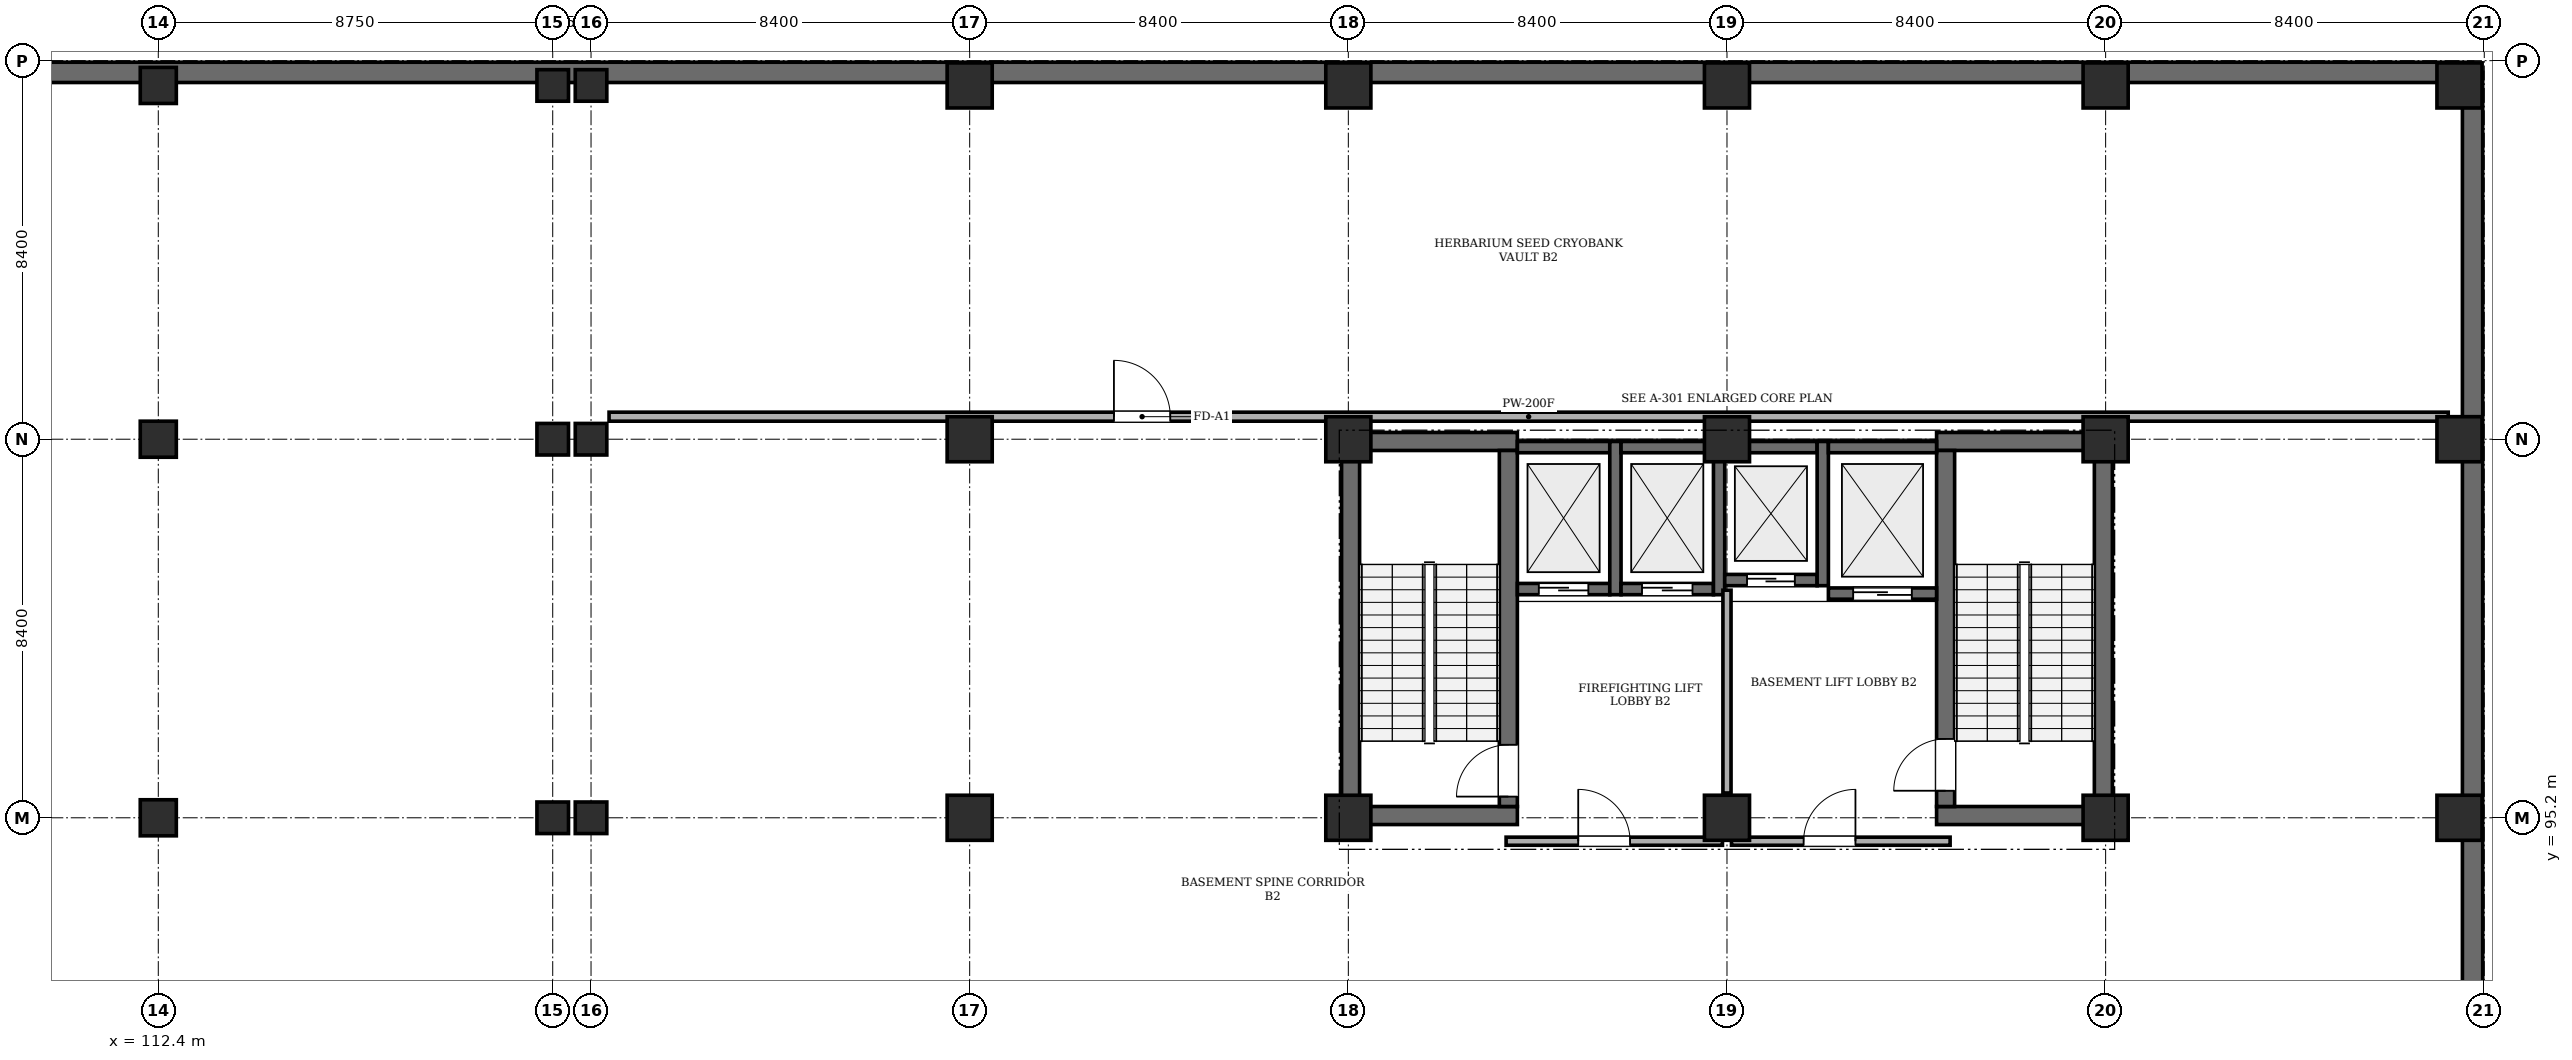
"""IFC4 building model, lengths in metres.
Left out: names, types, materials, properties, quantities, classifications, styles, units other than length and angle.
Written with IfcOpenShell. Run it as: python <this file> out.ifc"""

import sys

from ifc_helpers import new_model, si_unit, direction, frame, frame_2d, origin, origin_2d, place, context, subcontext, project, spatial, rectangle, extrude, element, fill, save


model = new_model("IFC4")
c1 = context("Model", 3, precision=1e-05, world=origin(), true_north=direction((0.0, 1.0)))
c2 = subcontext(c1, "Body", "Model", "MODEL_VIEW")
j1 = project(units=[si_unit("LENGTHUNIT", "METRE"), si_unit("PLANEANGLEUNIT", "RADIAN")], contexts=[c1])
p1 = place(None, origin())
s1 = spatial("IfcSite", under=j1, at=p1, CompositionType="ELEMENT")
p2 = place(p1, origin())
s2 = spatial("IfcBuilding", under=s1, at=p2, CompositionType="ELEMENT")
p3 = place(p2, frame((0.0, 0.0, -9.6)))
s3 = spatial("IfcBuildingStorey", under=s2, at=p3, CompositionType="ELEMENT", Elevation=-9.6)
for number, where, z_axis, x_axis in (
    (1, (112.4, 95.2, 0.0), (0.0, 0.0, 1.0), (1.0, 0.0, 0.0)),
    (2, (112.4, 103.6, 0.0), (0.0, 0.0, 1.0), (1.0, 0.0, 0.0)),
    (3, (112.4, 111.45, 0.0), (0.0, 0.0, 1.0), (1.0, 0.0, 0.0)),
):
    element("IfcColumn", number, at=place(p3, frame(where, z_axis=z_axis, x_axis=x_axis)), inside=s3, PredefinedType="COLUMN", context=c2, shape_type="SweptSolid", body=[
        extrude(rectangle(XDim=0.8, YDim=0.8, at=origin_2d()), origin(), (0.0, 0.0, 1.0), 4.48),
    ])
for number, where, z_axis, x_axis in (
    (4, (121.15, 95.2, 0.0), (0.0, 0.0, 1.0), (1.0, 0.0, 0.0)),
    (5, (121.15, 103.6, 0.0), (0.0, 0.0, 1.0), (1.0, 0.0, 0.0)),
    (6, (121.15, 111.45, 0.0), (0.0, 0.0, 1.0), (1.0, 0.0, 0.0)),
    (7, (122.0, 95.2, 0.0), (0.0, 0.0, 1.0), (1.0, 0.0, 0.0)),
    (8, (122.0, 103.6, 0.0), (0.0, 0.0, 1.0), (1.0, 0.0, 0.0)),
    (9, (122.0, 111.45, 0.0), (0.0, 0.0, 1.0), (1.0, 0.0, 0.0)),
):
    element("IfcColumn", number, at=place(p3, frame(where, z_axis=z_axis, x_axis=x_axis)), inside=s3, PredefinedType="COLUMN", context=c2, shape_type="SweptSolid", body=[
        extrude(rectangle(XDim=0.7, YDim=0.7, at=origin_2d()), origin(), (0.0, 0.0, 1.0), 4.48),
    ])
for number, where, z_axis, x_axis in (
    (10, (130.4, 95.2, 0.0), (0.0, 0.0, 1.0), (1.0, 0.0, 0.0)),
    (11, (130.4, 103.6, 0.0), (0.0, 0.0, 1.0), (1.0, 0.0, 0.0)),
    (12, (130.4, 111.45, 0.0), (0.0, 0.0, 1.0), (1.0, 0.0, 0.0)),
    (13, (138.8, 95.2, 0.0), (0.0, 0.0, 1.0), (1.0, 0.0, 0.0)),
    (14, (138.8, 103.6, 0.0), (0.0, 0.0, 1.0), (1.0, 0.0, 0.0)),
    (15, (138.8, 111.45, 0.0), (0.0, 0.0, 1.0), (1.0, 0.0, 0.0)),
    (16, (147.2, 95.2, 0.0), (0.0, 0.0, 1.0), (1.0, 0.0, 0.0)),
    (17, (147.2, 103.6, 0.0), (0.0, 0.0, 1.0), (1.0, 0.0, 0.0)),
    (18, (147.2, 111.45, 0.0), (0.0, 0.0, 1.0), (1.0, 0.0, 0.0)),
    (19, (155.6, 95.2, 0.0), (0.0, 0.0, 1.0), (1.0, 0.0, 0.0)),
    (20, (155.6, 103.6, 0.0), (0.0, 0.0, 1.0), (1.0, 0.0, 0.0)),
    (21, (155.6, 111.45, 0.0), (0.0, 0.0, 1.0), (1.0, 0.0, 0.0)),
    (22, (163.45, 95.2, 0.0), (0.0, 0.0, 1.0), (1.0, 0.0, 0.0)),
    (23, (163.45, 103.6, 0.0), (0.0, 0.0, 1.0), (1.0, 0.0, 0.0)),
    (24, (163.45, 111.45, 0.0), (0.0, 0.0, 1.0), (1.0, 0.0, 0.0)),
):
    element("IfcColumn", number, at=place(p3, frame(where, z_axis=z_axis, x_axis=x_axis)), inside=s3, PredefinedType="COLUMN", context=c2, shape_type="SweptSolid", body=[
        extrude(rectangle(XDim=1.0, YDim=1.0, at=origin_2d()), origin(), (0.0, 0.0, 1.0), 4.48),
    ])
p4 = place(p3, frame((163.74, 0.26, 0.0), z_axis=(0.0, 0.0, 1.0), x_axis=(0.0, 1.0, 0.0)))
e25 = element("IfcWall", 25, at=p4, inside=s3, PredefinedType="SHEAR", context=c2, shape_type="SweptSolid", body=[
    extrude(rectangle(XDim=111.48, YDim=0.45, at=frame_2d((55.74, 0.0))), origin(), (0.0, 0.0, 1.0), 3.7),
])
p5 = place(p3, frame((163.74, 111.74, 0.0), z_axis=(0.0, 0.0, 1.0), x_axis=(-1.0, 0.0, 0.0)))
e26 = element("IfcWall", 26, at=p5, inside=s3, PredefinedType="SHEAR", context=c2, shape_type="SweptSolid", body=[
    extrude(rectangle(XDim=163.48, YDim=0.45, at=frame_2d((81.74, 0.0))), origin(), (0.0, 0.0, 1.0), 3.7),
])
for number, where, z_axis, x_axis in (
    (27, (138.65, 95.25, 0.0), (0.0, 0.0, 1.0), (1.0, 0.0, 0.0)),
    (28, (138.65, 103.55, 0.0), (0.0, 0.0, 1.0), (1.0, 0.0, 0.0)),
):
    element("IfcWall", number, at=place(p3, frame(where, z_axis=z_axis, x_axis=x_axis)), inside=s3, PredefinedType="SHEAR", context=c2, shape_type="SweptSolid", body=[
        extrude(rectangle(XDim=3.9, YDim=0.4, at=frame_2d((1.95, 0.0))), origin(), (0.0, 0.0, 1.0), 4.48),
    ])
p6 = place(p3, frame((138.85, 95.45, 0.0), z_axis=(0.0, 0.0, 1.0), x_axis=(0.0, 1.0, 0.0)))
e29 = element("IfcWall", 29, at=p6, inside=s3, PredefinedType="SHEAR", context=c2, shape_type="SweptSolid", body=[
    extrude(rectangle(XDim=7.9, YDim=0.4, at=frame_2d((3.95, 0.0))), origin(), (0.0, 0.0, 1.0), 4.48),
])
p7 = place(p3, frame((142.35, 95.45, 0.0), z_axis=(0.0, 0.0, 1.0), x_axis=(0.0, 1.0, 0.0)))
e30 = element("IfcWall", 30, at=p7, inside=s3, PredefinedType="SHEAR", context=c2, shape_type="SweptSolid", body=[
    extrude(rectangle(XDim=7.9, YDim=0.4, at=frame_2d((3.95, 0.0))), origin(), (0.0, 0.0, 1.0), 4.48),
])
p8 = place(p7, frame((0.22, 0.0, 0.0)))
e31 = element("IfcOpeningElement", 31, at=p8, cuts=e30, PredefinedType="OPENING", context=c2, shape_type="SweptSolid", body=[
    extrude(rectangle(XDim=1.15, YDim=2.15, at=frame_2d((0.575, 1.075))), frame((0.0, 0.21, 0.0), z_axis=(0.0, -1.0, 0.0), x_axis=(1.0, 0.0, 0.0)), (0.0, 0.0, 1.0), 0.42),
])
for number, where, z_axis, x_axis in (
    (32, (151.85, 95.25, 0.0), (0.0, 0.0, 1.0), (1.0, 0.0, 0.0)),
    (33, (151.85, 103.55, 0.0), (0.0, 0.0, 1.0), (1.0, 0.0, 0.0)),
):
    element("IfcWall", number, at=place(p3, frame(where, z_axis=z_axis, x_axis=x_axis)), inside=s3, PredefinedType="SHEAR", context=c2, shape_type="SweptSolid", body=[
        extrude(rectangle(XDim=3.9, YDim=0.4, at=frame_2d((1.95, 0.0))), origin(), (0.0, 0.0, 1.0), 4.48),
    ])
p9 = place(p3, frame((152.05, 95.45, 0.0), z_axis=(0.0, 0.0, 1.0), x_axis=(0.0, 1.0, 0.0)))
e34 = element("IfcWall", 34, at=p9, inside=s3, PredefinedType="SHEAR", context=c2, shape_type="SweptSolid", body=[
    extrude(rectangle(XDim=7.9, YDim=0.4, at=frame_2d((3.95, 0.0))), origin(), (0.0, 0.0, 1.0), 4.48),
])
p10 = place(p9, frame((0.35, 0.0, 0.0)))
e35 = element("IfcOpeningElement", 35, at=p10, cuts=e34, PredefinedType="OPENING", context=c2, shape_type="SweptSolid", body=[
    extrude(rectangle(XDim=1.15, YDim=2.15, at=frame_2d((0.575, 1.075))), frame((0.0, 0.21, 0.0), z_axis=(0.0, -1.0, 0.0), x_axis=(1.0, 0.0, 0.0)), (0.0, 0.0, 1.0), 0.42),
])
p11 = place(p3, frame((155.55, 95.45, 0.0), z_axis=(0.0, 0.0, 1.0), x_axis=(0.0, 1.0, 0.0)))
e36 = element("IfcWall", 36, at=p11, inside=s3, PredefinedType="SHEAR", context=c2, shape_type="SweptSolid", body=[
    extrude(rectangle(XDim=7.9, YDim=0.4, at=frame_2d((3.95, 0.0))), origin(), (0.0, 0.0, 1.0), 4.48),
])
p12 = place(p3, frame((142.55, 100.275, 0.0), z_axis=(0.0, 0.0, 1.0), x_axis=(1.0, 0.0, 0.0)))
e37 = element("IfcWall", 37, at=p12, inside=s3, PredefinedType="SHEAR", context=c2, shape_type="SweptSolid", body=[
    extrude(rectangle(XDim=2.05, YDim=0.25, at=frame_2d((1.025, 0.0))), origin(), (0.0, 0.0, 1.0), 4.48),
])
p13 = place(p12, frame((0.475, 0.0, 0.0)))
e38 = element("IfcOpeningElement", 38, at=p13, cuts=e37, PredefinedType="OPENING", context=c2, shape_type="SweptSolid", body=[
    extrude(rectangle(XDim=1.1, YDim=2.15, at=frame_2d((0.55, 1.075))), frame((0.0, 0.135, 0.0), z_axis=(0.0, -1.0, 0.0), x_axis=(1.0, 0.0, 0.0)), (0.0, 0.0, 1.0), 0.27),
])
p14 = place(p3, frame((142.55, 103.425, 0.0), z_axis=(0.0, 0.0, 1.0), x_axis=(1.0, 0.0, 0.0)))
e39 = element("IfcWall", 39, at=p14, inside=s3, PredefinedType="SHEAR", context=c2, shape_type="SweptSolid", body=[
    extrude(rectangle(XDim=2.05, YDim=0.25, at=frame_2d((1.025, 0.0))), origin(), (0.0, 0.0, 1.0), 4.48),
])
p15 = place(p3, frame((144.725, 100.15, 0.0), z_axis=(0.0, 0.0, 1.0), x_axis=(0.0, 1.0, 0.0)))
e40 = element("IfcWall", 40, at=p15, inside=s3, PredefinedType="SHEAR", context=c2, shape_type="SweptSolid", body=[
    extrude(rectangle(XDim=3.4, YDim=0.25, at=frame_2d((1.7, 0.0))), origin(), (0.0, 0.0, 1.0), 4.48),
])
p16 = place(p3, frame((144.85, 100.275, 0.0), z_axis=(0.0, 0.0, 1.0), x_axis=(1.0, 0.0, 0.0)))
e41 = element("IfcWall", 41, at=p16, inside=s3, PredefinedType="SHEAR", context=c2, shape_type="SweptSolid", body=[
    extrude(rectangle(XDim=2.05, YDim=0.25, at=frame_2d((1.025, 0.0))), origin(), (0.0, 0.0, 1.0), 4.48),
])
p17 = place(p16, frame((0.465, 0.0, 0.0)))
e42 = element("IfcOpeningElement", 42, at=p17, cuts=e41, PredefinedType="OPENING", context=c2, shape_type="SweptSolid", body=[
    extrude(rectangle(XDim=1.12, YDim=2.15, at=frame_2d((0.56, 1.075))), frame((0.0, 0.135, 0.0), z_axis=(0.0, -1.0, 0.0), x_axis=(1.0, 0.0, 0.0)), (0.0, 0.0, 1.0), 0.27),
])
p18 = place(p3, frame((144.85, 103.425, 0.0), z_axis=(0.0, 0.0, 1.0), x_axis=(1.0, 0.0, 0.0)))
e43 = element("IfcWall", 43, at=p18, inside=s3, PredefinedType="SHEAR", context=c2, shape_type="SweptSolid", body=[
    extrude(rectangle(XDim=2.05, YDim=0.25, at=frame_2d((1.025, 0.0))), origin(), (0.0, 0.0, 1.0), 4.48),
])
p19 = place(p3, frame((147.025, 100.15, 0.0), z_axis=(0.0, 0.0, 1.0), x_axis=(0.0, 1.0, 0.0)))
e44 = element("IfcWall", 44, at=p19, inside=s3, PredefinedType="SHEAR", context=c2, shape_type="SweptSolid", body=[
    extrude(rectangle(XDim=3.4, YDim=0.25, at=frame_2d((1.7, 0.0))), origin(), (0.0, 0.0, 1.0), 4.48),
])
p20 = place(p3, frame((147.15, 100.475, 0.0), z_axis=(0.0, 0.0, 1.0), x_axis=(1.0, 0.0, 0.0)))
e45 = element("IfcWall", 45, at=p20, inside=s3, PredefinedType="SHEAR", context=c2, shape_type="SweptSolid", body=[
    extrude(rectangle(XDim=2.05, YDim=0.25, at=frame_2d((1.025, 0.0))), origin(), (0.0, 0.0, 1.0), 4.48),
])
p21 = place(p20, frame((0.495, 0.0, 0.0)))
e46 = element("IfcOpeningElement", 46, at=p21, cuts=e45, PredefinedType="OPENING", context=c2, shape_type="SweptSolid", body=[
    extrude(rectangle(XDim=1.06, YDim=2.15, at=frame_2d((0.53, 1.075))), frame((0.0, 0.135, 0.0), z_axis=(0.0, -1.0, 0.0), x_axis=(1.0, 0.0, 0.0)), (0.0, 0.0, 1.0), 0.27),
])
p22 = place(p3, frame((147.15, 103.425, 0.0), z_axis=(0.0, 0.0, 1.0), x_axis=(1.0, 0.0, 0.0)))
e47 = element("IfcWall", 47, at=p22, inside=s3, PredefinedType="SHEAR", context=c2, shape_type="SweptSolid", body=[
    extrude(rectangle(XDim=2.05, YDim=0.25, at=frame_2d((1.025, 0.0))), origin(), (0.0, 0.0, 1.0), 4.48),
])
p23 = place(p3, frame((149.325, 100.35, 0.0), z_axis=(0.0, 0.0, 1.0), x_axis=(0.0, 1.0, 0.0)))
e48 = element("IfcWall", 48, at=p23, inside=s3, PredefinedType="SHEAR", context=c2, shape_type="SweptSolid", body=[
    extrude(rectangle(XDim=3.2, YDim=0.25, at=frame_2d((1.6, 0.0))), origin(), (0.0, 0.0, 1.0), 4.48),
])
p24 = place(p3, frame((149.45, 100.175, 0.0), z_axis=(0.0, 0.0, 1.0), x_axis=(1.0, 0.0, 0.0)))
e49 = element("IfcWall", 49, at=p24, inside=s3, PredefinedType="SHEAR", context=c2, shape_type="SweptSolid", body=[
    extrude(rectangle(XDim=2.4, YDim=0.25, at=frame_2d((1.2, 0.0))), origin(), (0.0, 0.0, 1.0), 4.48),
])
p25 = place(p24, frame((0.55, 0.0, 0.0)))
e50 = element("IfcOpeningElement", 50, at=p25, cuts=e49, PredefinedType="OPENING", context=c2, shape_type="SweptSolid", body=[
    extrude(rectangle(XDim=1.3, YDim=2.25, at=frame_2d((0.65, 1.125))), frame((0.0, 0.135, 0.0), z_axis=(0.0, -1.0, 0.0), x_axis=(1.0, 0.0, 0.0)), (0.0, 0.0, 1.0), 0.27),
])
p26 = place(p3, frame((149.45, 103.425, 0.0), z_axis=(0.0, 0.0, 1.0), x_axis=(1.0, 0.0, 0.0)))
e51 = element("IfcWall", 51, at=p26, inside=s3, PredefinedType="SHEAR", context=c2, shape_type="SweptSolid", body=[
    extrude(rectangle(XDim=2.4, YDim=0.25, at=frame_2d((1.2, 0.0))), origin(), (0.0, 0.0, 1.0), 4.48),
])
p27 = place(p3, frame((142.3, 94.68, 0.0), z_axis=(0.0, 0.0, 1.0), x_axis=(1.0, 0.0, 0.0)))
e52 = element("IfcWall", 52, at=p27, inside=s3, PredefinedType="STANDARD", context=c2, shape_type="SweptSolid", body=[
    extrude(rectangle(XDim=4.8, YDim=0.18, at=frame_2d((2.4, 0.0))), origin(), (0.0, 0.0, 1.0), 4.48),
])
p28 = place(p27, frame((1.6, 0.0, 0.0)))
e53 = element("IfcOpeningElement", 53, at=p28, cuts=e52, PredefinedType="OPENING", context=c2, shape_type="SweptSolid", body=[
    extrude(rectangle(XDim=1.15, YDim=2.15, at=frame_2d((0.575, 1.075))), frame((0.0, 0.1, 0.0), z_axis=(0.0, -1.0, 0.0), x_axis=(1.0, 0.0, 0.0)), (0.0, 0.0, 1.0), 0.2),
])
p29 = place(p3, frame((147.3, 94.68, 0.0), z_axis=(0.0, 0.0, 1.0), x_axis=(1.0, 0.0, 0.0)))
e54 = element("IfcWall", 54, at=p29, inside=s3, PredefinedType="STANDARD", context=c2, shape_type="SweptSolid", body=[
    extrude(rectangle(XDim=4.85, YDim=0.18, at=frame_2d((2.425, 0.0))), origin(), (0.0, 0.0, 1.0), 4.48),
])
p30 = place(p29, frame((1.6, 0.0, 0.0)))
e55 = element("IfcOpeningElement", 55, at=p30, cuts=e54, PredefinedType="OPENING", context=c2, shape_type="SweptSolid", body=[
    extrude(rectangle(XDim=1.15, YDim=2.15, at=frame_2d((0.575, 1.075))), frame((0.0, 0.1, 0.0), z_axis=(0.0, -1.0, 0.0), x_axis=(1.0, 0.0, 0.0)), (0.0, 0.0, 1.0), 0.2),
])
p31 = place(p3, frame((147.2, 95.75, 0.0), z_axis=(0.0, 0.0, 1.0), x_axis=(0.0, 1.0, 0.0)))
e56 = element("IfcWall", 56, at=p31, inside=s3, PredefinedType="STANDARD", context=c2, shape_type="SweptSolid", body=[
    extrude(rectangle(XDim=4.5, YDim=0.18, at=frame_2d((2.25, 0.0))), origin(), (0.0, 0.0, 1.0), 3.63),
])
p32 = place(p3, frame((122.4, 104.1, 0.0), z_axis=(0.0, 0.0, 1.0), x_axis=(1.0, 0.0, 0.0)))
e57 = element("IfcWall", 57, at=p32, inside=s3, PredefinedType="SOLIDWALL", context=c2, shape_type="SweptSolid", body=[
    extrude(rectangle(XDim=40.8, YDim=0.2, at=frame_2d((20.4, 0.0))), origin(), (0.0, 0.0, 1.0), 4.48),
])
p33 = place(p32, frame((11.2, 0.0, 0.0)))
e58 = element("IfcOpeningElement", 58, at=p33, cuts=e57, PredefinedType="OPENING", context=c2, shape_type="SweptSolid", body=[
    extrude(rectangle(XDim=1.25, YDim=2.2, at=frame_2d((0.625, 1.1))), frame((0.0, 0.11, 0.0), z_axis=(0.0, -1.0, 0.0), x_axis=(1.0, 0.0, 0.0)), (0.0, 0.0, 1.0), 0.22),
])
p34 = place(p28, origin())
e59 = element("IfcDoor", 59, at=p34, inside=s3, OperationType="SINGLE_SWING_LEFT", PredefinedType="DOOR", context=c2, shape_type="SweptSolid", body=[
    extrude(rectangle(XDim=1.15, YDim=2.15, at=frame_2d((0.575, 1.075))), frame((0.0, 0.025, 0.0), z_axis=(0.0, -1.0, 0.0), x_axis=(1.0, 0.0, 0.0)), (0.0, 0.0, 1.0), 0.05),
])
fill(e53, e59)
p35 = place(p30, origin())
e60 = element("IfcDoor", 60, at=p35, inside=s3, OperationType="SINGLE_SWING_RIGHT", PredefinedType="DOOR", context=c2, shape_type="SweptSolid", body=[
    extrude(rectangle(XDim=1.15, YDim=2.15, at=frame_2d((0.575, 1.075))), frame((0.0, 0.025, 0.0), z_axis=(0.0, -1.0, 0.0), x_axis=(1.0, 0.0, 0.0)), (0.0, 0.0, 1.0), 0.05),
])
fill(e55, e60)
p36 = place(p33, origin())
e61 = element("IfcDoor", 61, at=p36, inside=s3, OperationType="SINGLE_SWING_LEFT", PredefinedType="DOOR", context=c2, shape_type="SweptSolid", body=[
    extrude(rectangle(XDim=1.25, YDim=2.2, at=frame_2d((0.625, 1.1))), frame((0.0, 0.025, 0.0), z_axis=(0.0, -1.0, 0.0), x_axis=(1.0, 0.0, 0.0)), (0.0, 0.0, 1.0), 0.05),
])
fill(e58, e61)
p37 = place(p8, origin())
e62 = element("IfcDoor", 62, at=p37, inside=s3, OperationType="SINGLE_SWING_LEFT", PredefinedType="DOOR", context=c2, shape_type="SweptSolid", body=[
    extrude(rectangle(XDim=1.15, YDim=2.15, at=frame_2d((0.575, 1.075))), frame((0.0, 0.025, 0.0), z_axis=(0.0, -1.0, 0.0), x_axis=(1.0, 0.0, 0.0)), (0.0, 0.0, 1.0), 0.05),
])
fill(e31, e62)
p38 = place(p10, origin())
e63 = element("IfcDoor", 63, at=p38, inside=s3, OperationType="SINGLE_SWING_LEFT", PredefinedType="DOOR", context=c2, shape_type="SweptSolid", body=[
    extrude(rectangle(XDim=1.15, YDim=2.15, at=frame_2d((0.575, 1.075))), frame((0.0, 0.025, 0.0), z_axis=(0.0, -1.0, 0.0), x_axis=(1.0, 0.0, 0.0)), (0.0, 0.0, 1.0), 0.05),
])
fill(e35, e63)
p39 = place(p13, origin())
e64 = element("IfcDoor", 64, at=p39, inside=s3, OperationType="SLIDING_TO_LEFT", PredefinedType="DOOR", context=c2, shape_type="SweptSolid", body=[
    extrude(rectangle(XDim=1.1, YDim=2.15, at=frame_2d((0.55, 1.075))), frame((0.0, 0.025, 0.0), z_axis=(0.0, -1.0, 0.0), x_axis=(1.0, 0.0, 0.0)), (0.0, 0.0, 1.0), 0.05),
])
fill(e38, e64)
p40 = place(p17, origin())
e65 = element("IfcDoor", 65, at=p40, inside=s3, OperationType="SLIDING_TO_LEFT", PredefinedType="DOOR", context=c2, shape_type="SweptSolid", body=[
    extrude(rectangle(XDim=1.12, YDim=2.15, at=frame_2d((0.56, 1.075))), frame((0.0, 0.025, 0.0), z_axis=(0.0, -1.0, 0.0), x_axis=(1.0, 0.0, 0.0)), (0.0, 0.0, 1.0), 0.05),
])
fill(e42, e65)
p41 = place(p21, origin())
e66 = element("IfcDoor", 66, at=p41, inside=s3, OperationType="SLIDING_TO_LEFT", PredefinedType="DOOR", context=c2, shape_type="SweptSolid", body=[
    extrude(rectangle(XDim=1.06, YDim=2.15, at=frame_2d((0.53, 1.075))), frame((0.0, 0.025, 0.0), z_axis=(0.0, -1.0, 0.0), x_axis=(1.0, 0.0, 0.0)), (0.0, 0.0, 1.0), 0.05),
])
fill(e46, e66)
p42 = place(p25, origin())
e67 = element("IfcDoor", 67, at=p42, inside=s3, OperationType="SLIDING_TO_LEFT", PredefinedType="DOOR", context=c2, shape_type="SweptSolid", body=[
    extrude(rectangle(XDim=1.3, YDim=2.25, at=frame_2d((0.65, 1.125))), frame((0.0, 0.025, 0.0), z_axis=(0.0, -1.0, 0.0), x_axis=(1.0, 0.0, 0.0)), (0.0, 0.0, 1.0), 0.05),
])
fill(e50, e67)
save(model, sys.argv[1])
